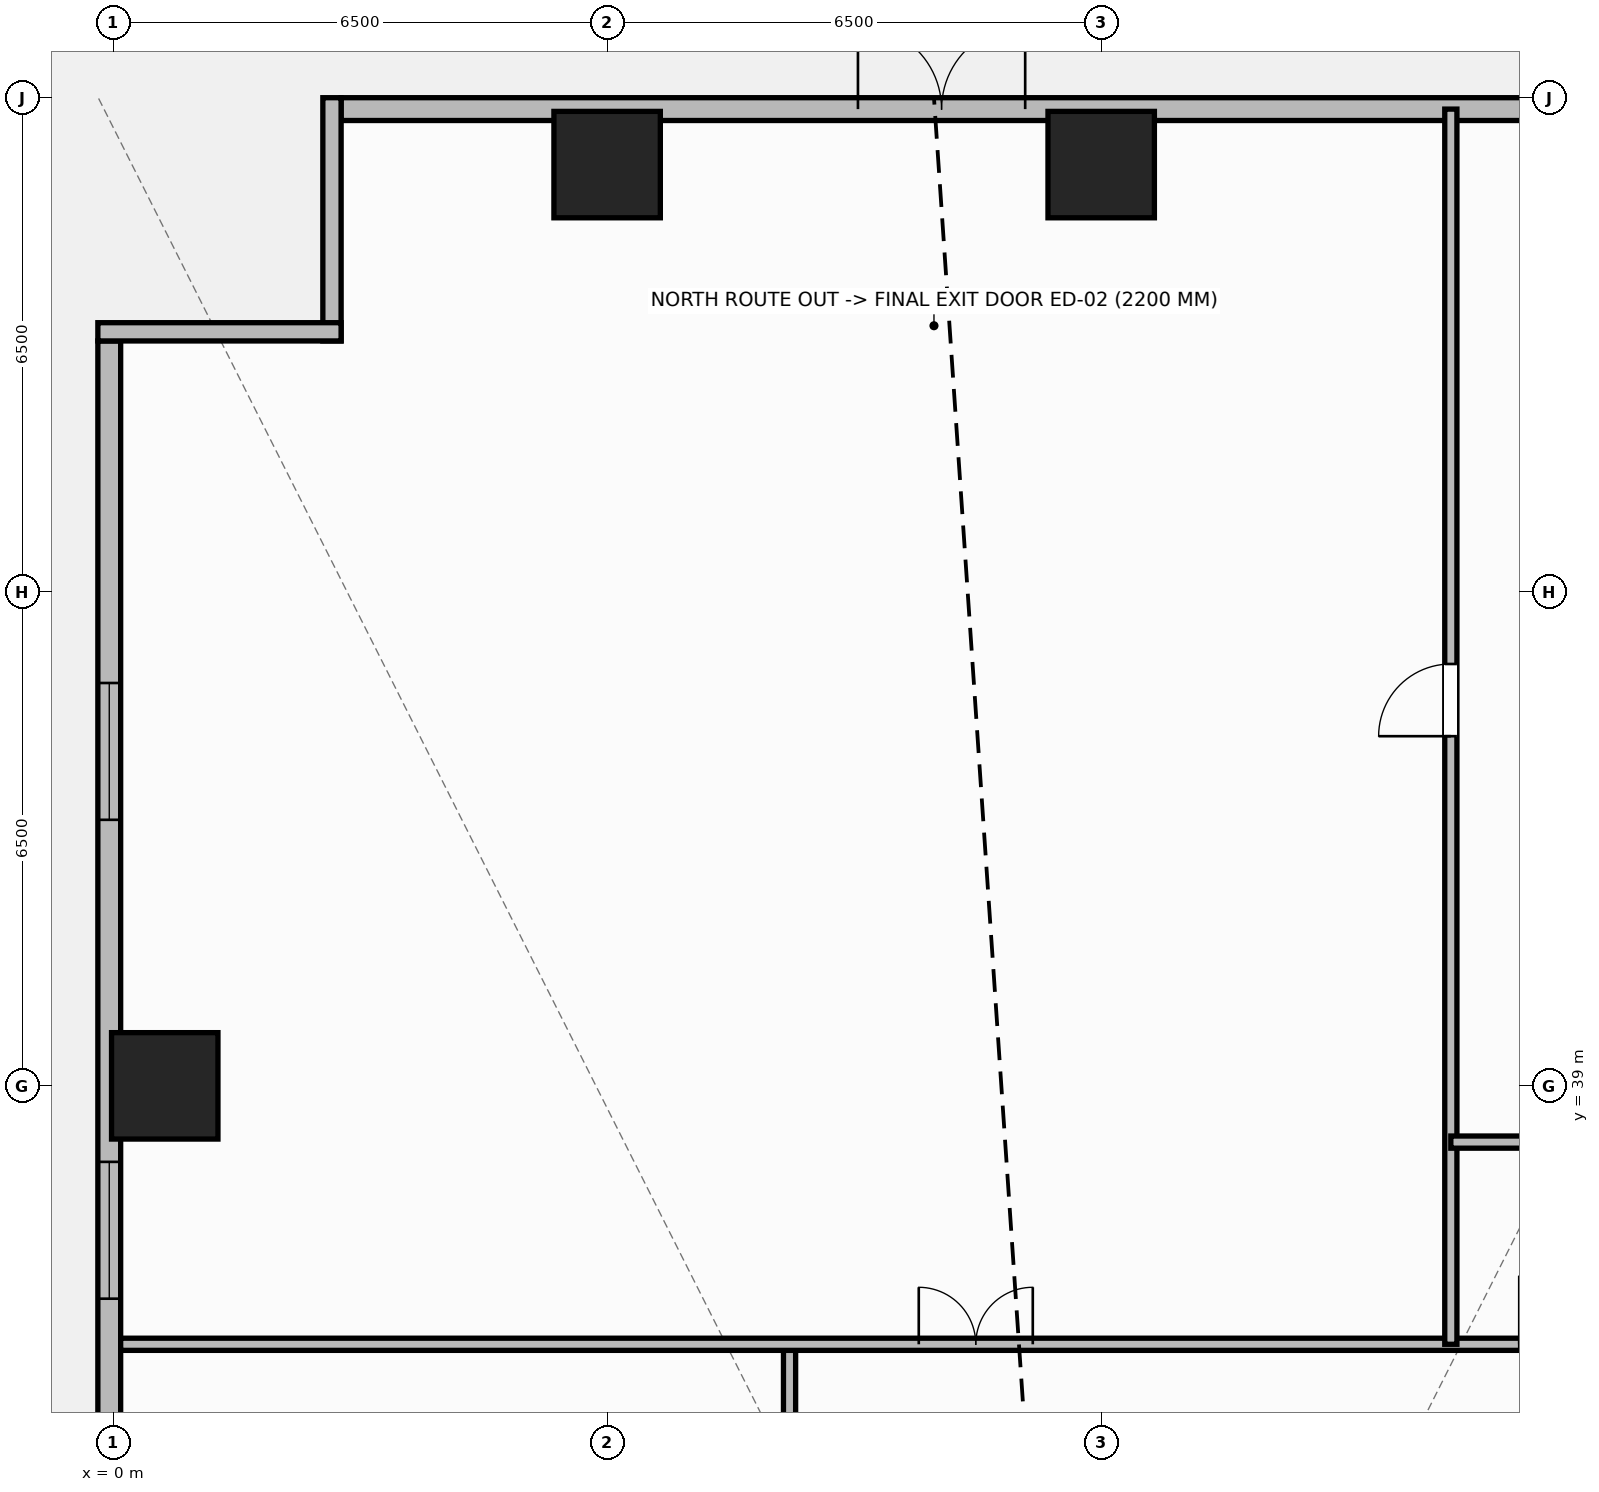
"""IFC4 building model, lengths in metres.
Left out: names, types, materials, properties, quantities, classifications, styles, units other than length and angle.
Written with IfcOpenShell. Run it as: python <this file> out.ifc"""

import sys

from ifc_helpers import new_model, si_unit, direction, frame, frame_2d, origin, origin_2d, place, context, subcontext, project, spatial, rectangle, extrude, element, fill, save


model = new_model("IFC4")
c1 = context("Model", 3, precision=1e-05, world=origin(), true_north=direction((0.0, 1.0)))
c2 = subcontext(c1, "Body", "Model", "MODEL_VIEW")
j1 = project(units=[si_unit("LENGTHUNIT", "METRE"), si_unit("PLANEANGLEUNIT", "RADIAN")], contexts=[c1])
p1 = place(None, origin())
s1 = spatial("IfcSite", under=j1, at=p1, CompositionType="ELEMENT")
p2 = place(p1, origin())
s2 = spatial("IfcBuilding", under=s1, at=p2, CompositionType="ELEMENT")
p3 = place(p2, origin())
s3 = spatial("IfcBuildingStorey", under=s2, at=p3, CompositionType="ELEMENT", Elevation=0.0)
for number, where, z_axis, x_axis in (
    (1, (6.5, 51.12, 0.0), (0.0, 0.0, 1.0), (1.0, 0.0, 0.0)),
    (2, (13.0, 51.12, 0.0), (0.0, 0.0, 1.0), (1.0, 0.0, 0.0)),
    (3, (0.68, 39.0, 0.0), (0.0, 0.0, 1.0), (1.0, 0.0, 0.0)),
):
    element("IfcColumn", number, at=place(p3, frame(where, z_axis=z_axis, x_axis=x_axis)), inside=s3, PredefinedType="COLUMN", context=c2, shape_type="SweptSolid", body=[
        extrude(rectangle(XDim=1.4, YDim=1.4, at=origin_2d()), origin(), (0.0, 0.0, 1.0), 6.0),
    ])
p4 = place(p3, frame((-0.05, 3.2, 0.0), z_axis=(0.0, 0.0, 1.0), x_axis=(0.0, 1.0, 0.0)))
e4 = element("IfcWall", 4, at=p4, inside=s3, PredefinedType="STANDARD", context=c2, shape_type="SweptSolid", body=[
    extrude(rectangle(XDim=45.6, YDim=0.3, at=frame_2d((22.8, 0.0))), origin(), (0.0, 0.0, 1.0), 5.72),
])
p5 = place(p4, frame((17.8, 0.0, 0.0)))
e5 = element("IfcOpeningElement", 5, at=p5, cuts=e4, PredefinedType="OPENING", context=c2, shape_type="SweptSolid", body=[
    extrude(rectangle(XDim=2.2, YDim=2.4, at=frame_2d((1.1, 1.2))), frame((0.0, 0.16, 0.0), z_axis=(0.0, -1.0, 0.0), x_axis=(1.0, 0.0, 0.0)), (0.0, 0.0, 1.0), 0.32),
])
p6 = place(p4, frame((24.8, 0.0, 0.0)))
e6 = element("IfcOpeningElement", 6, at=p6, cuts=e4, PredefinedType="OPENING", context=c2, shape_type="SweptSolid", body=[
    extrude(rectangle(XDim=1.1, YDim=2.2, at=frame_2d((0.55, 1.1))), frame((0.0, 0.16, 0.0), z_axis=(0.0, -1.0, 0.0), x_axis=(1.0, 0.0, 0.0)), (0.0, 0.0, 1.0), 0.32),
])
p7 = place(p4, frame((4.3, 0.0, 0.9)))
e7 = element("IfcOpeningElement", 7, at=p7, cuts=e4, PredefinedType="OPENING", context=c2, shape_type="SweptSolid", body=[
    extrude(rectangle(XDim=1.8, YDim=2.2, at=frame_2d((0.9, 1.1))), frame((0.0, 0.16, 0.0), z_axis=(0.0, -1.0, 0.0), x_axis=(1.0, 0.0, 0.0)), (0.0, 0.0, 1.0), 0.32),
])
p8 = place(p4, frame((11.3, 0.0, 0.9)))
e8 = element("IfcOpeningElement", 8, at=p8, cuts=e4, PredefinedType="OPENING", context=c2, shape_type="SweptSolid", body=[
    extrude(rectangle(XDim=1.8, YDim=2.2, at=frame_2d((0.9, 1.1))), frame((0.0, 0.16, 0.0), z_axis=(0.0, -1.0, 0.0), x_axis=(1.0, 0.0, 0.0)), (0.0, 0.0, 1.0), 0.32),
])
p9 = place(p4, frame((33.0, 0.0, 0.9)))
e9 = element("IfcOpeningElement", 9, at=p9, cuts=e4, PredefinedType="OPENING", context=c2, shape_type="SweptSolid", body=[
    extrude(rectangle(XDim=1.8, YDim=2.2, at=frame_2d((0.9, 1.1))), frame((0.0, 0.16, 0.0), z_axis=(0.0, -1.0, 0.0), x_axis=(1.0, 0.0, 0.0)), (0.0, 0.0, 1.0), 0.32),
])
p10 = place(p4, frame((39.3, 0.0, 0.9)))
e10 = element("IfcOpeningElement", 10, at=p10, cuts=e4, PredefinedType="OPENING", context=c2, shape_type="SweptSolid", body=[
    extrude(rectangle(XDim=1.8, YDim=2.2, at=frame_2d((0.9, 1.1))), frame((0.0, 0.16, 0.0), z_axis=(0.0, -1.0, 0.0), x_axis=(1.0, 0.0, 0.0)), (0.0, 0.0, 1.0), 0.32),
])
p11 = place(p3, frame((3.0, 51.85, 0.0), z_axis=(0.0, 0.0, 1.0), x_axis=(1.0, 0.0, 0.0)))
e11 = element("IfcWall", 11, at=p11, inside=s3, PredefinedType="STANDARD", context=c2, shape_type="SweptSolid", body=[
    extrude(rectangle(XDim=23.0, YDim=0.3, at=frame_2d((11.5, 0.0))), origin(), (0.0, 0.0, 1.0), 5.72),
])
p12 = place(p11, frame((6.8, 0.0, 0.0)))
e12 = element("IfcOpeningElement", 12, at=p12, cuts=e11, PredefinedType="OPENING", context=c2, shape_type="SweptSolid", body=[
    extrude(rectangle(XDim=2.2, YDim=2.4, at=frame_2d((1.1, 1.2))), frame((0.0, 0.16, 0.0), z_axis=(0.0, -1.0, 0.0), x_axis=(1.0, 0.0, 0.0)), (0.0, 0.0, 1.0), 0.32),
])
for number, where, z_axis, x_axis in (
    (13, (2.88, 48.8, 0.0), (0.0, 0.0, 1.0), (0.0, 1.0, 0.0)),
    (14, (-0.2, 48.92, 0.0), (0.0, 0.0, 1.0), (1.0, 0.0, 0.0)),
):
    element("IfcWall", number, at=place(p3, frame(where, z_axis=z_axis, x_axis=x_axis)), inside=s3, PredefinedType="STANDARD", context=c2, shape_type="SweptSolid", body=[
        extrude(rectangle(XDim=3.2, YDim=0.24, at=frame_2d((1.6, 0.0))), origin(), (0.0, 0.0, 1.0), 5.72),
    ])
p13 = place(p3, frame((8.9, 26.3, 0.0), z_axis=(0.0, 0.0, 1.0), x_axis=(0.0, 1.0, 0.0)))
e15 = element("IfcWall", 15, at=p13, inside=s3, PredefinedType="STANDARD", context=c2, shape_type="SweptSolid", body=[
    extrude(rectangle(XDim=9.3, YDim=0.16, at=frame_2d((4.65, 0.0))), origin(), (0.0, 0.0, 1.0), 5.72),
])
p14 = place(p13, frame((2.2, 0.0, 0.0)))
e16 = element("IfcOpeningElement", 16, at=p14, cuts=e15, PredefinedType="OPENING", context=c2, shape_type="SweptSolid", body=[
    extrude(rectangle(XDim=1.0, YDim=2.15, at=frame_2d((0.5, 1.075))), frame((0.0, 0.09, 0.0), z_axis=(0.0, -1.0, 0.0), x_axis=(1.0, 0.0, 0.0)), (0.0, 0.0, 1.0), 0.18),
])
p15 = place(p3, frame((0.1, 35.6, 0.0), z_axis=(0.0, 0.0, 1.0), x_axis=(1.0, 0.0, 0.0)))
e17 = element("IfcWall", 17, at=p15, inside=s3, PredefinedType="STANDARD", context=c2, shape_type="SweptSolid", body=[
    extrude(rectangle(XDim=25.82, YDim=0.16, at=frame_2d((12.91, 0.0))), origin(), (0.0, 0.0, 1.0), 5.72),
])
p16 = place(p15, frame((10.5, 0.0, 0.0)))
e18 = element("IfcOpeningElement", 18, at=p16, cuts=e17, PredefinedType="OPENING", context=c2, shape_type="SweptSolid", body=[
    extrude(rectangle(XDim=1.5, YDim=2.2, at=frame_2d((0.75, 1.1))), frame((0.0, 0.09, 0.0), z_axis=(0.0, -1.0, 0.0), x_axis=(1.0, 0.0, 0.0)), (0.0, 0.0, 1.0), 0.18),
])
p17 = place(p15, frame((18.4, 0.0, 0.0)))
e19 = element("IfcOpeningElement", 19, at=p17, cuts=e17, PredefinedType="OPENING", context=c2, shape_type="SweptSolid", body=[
    extrude(rectangle(XDim=0.9, YDim=2.15, at=frame_2d((0.45, 1.075))), frame((0.0, 0.09, 0.0), z_axis=(0.0, -1.0, 0.0), x_axis=(1.0, 0.0, 0.0)), (0.0, 0.0, 1.0), 0.18),
])
p18 = place(p15, frame((21.35, 0.0, 0.0)))
e20 = element("IfcOpeningElement", 20, at=p18, cuts=e17, PredefinedType="OPENING", context=c2, shape_type="SweptSolid", body=[
    extrude(rectangle(XDim=0.9, YDim=2.15, at=frame_2d((0.45, 1.075))), frame((0.0, 0.09, 0.0), z_axis=(0.0, -1.0, 0.0), x_axis=(1.0, 0.0, 0.0)), (0.0, 0.0, 1.0), 0.18),
])
p19 = place(p15, frame((23.95, 0.0, 0.0)))
e21 = element("IfcOpeningElement", 21, at=p19, cuts=e17, PredefinedType="OPENING", context=c2, shape_type="SweptSolid", body=[
    extrude(rectangle(XDim=0.9, YDim=2.15, at=frame_2d((0.45, 1.075))), frame((0.0, 0.09, 0.0), z_axis=(0.0, -1.0, 0.0), x_axis=(1.0, 0.0, 0.0)), (0.0, 0.0, 1.0), 0.18),
])
p20 = place(p3, frame((17.6, 35.6, 0.0), z_axis=(0.0, 0.0, 1.0), x_axis=(0.0, 1.0, 0.0)))
e22 = element("IfcWall", 22, at=p20, inside=s3, PredefinedType="STANDARD", context=c2, shape_type="SweptSolid", body=[
    extrude(rectangle(XDim=16.25, YDim=0.16, at=frame_2d((8.125, 0.0))), origin(), (0.0, 0.0, 1.0), 5.72),
])
p21 = place(p20, frame((8.0, 0.0, 0.0)))
e23 = element("IfcOpeningElement", 23, at=p21, cuts=e22, PredefinedType="OPENING", context=c2, shape_type="SweptSolid", body=[
    extrude(rectangle(XDim=0.95, YDim=2.15, at=frame_2d((0.475, 1.075))), frame((0.0, 0.09, 0.0), z_axis=(0.0, -1.0, 0.0), x_axis=(1.0, 0.0, 0.0)), (0.0, 0.0, 1.0), 0.18),
])
p22 = place(p3, frame((17.6, 38.26, 0.0), z_axis=(0.0, 0.0, 1.0), x_axis=(1.0, 0.0, 0.0)))
e24 = element("IfcWall", 24, at=p22, inside=s3, PredefinedType="STANDARD", context=c2, shape_type="SweptSolid", body=[
    extrude(rectangle(XDim=8.24, YDim=0.16, at=frame_2d((4.12, 0.0))), origin(), (0.0, 0.0, 1.0), 5.72),
])
p23 = place(p9, origin())
e25 = element("IfcWindow", 25, at=p23, inside=s3, PartitioningType="SINGLE_PANEL", PredefinedType="WINDOW", context=c2, shape_type="SweptSolid", body=[
    extrude(rectangle(XDim=1.8, YDim=2.2, at=frame_2d((0.9, 1.1))), frame((0.0, 0.03, 0.0), z_axis=(0.0, -1.0, 0.0), x_axis=(1.0, 0.0, 0.0)), (0.0, 0.0, 1.0), 0.06),
])
fill(e9, e25)
p24 = place(p10, origin())
e26 = element("IfcWindow", 26, at=p24, inside=s3, PartitioningType="SINGLE_PANEL", PredefinedType="WINDOW", context=c2, shape_type="SweptSolid", body=[
    extrude(rectangle(XDim=1.8, YDim=2.2, at=frame_2d((0.9, 1.1))), frame((0.0, 0.03, 0.0), z_axis=(0.0, -1.0, 0.0), x_axis=(1.0, 0.0, 0.0)), (0.0, 0.0, 1.0), 0.06),
])
fill(e10, e26)
p25 = place(p12, origin())
e27 = element("IfcDoor", 27, at=p25, inside=s3, OperationType="DOUBLE_DOOR_SINGLE_SWING", PredefinedType="DOOR", context=c2, shape_type="SweptSolid", body=[
    extrude(rectangle(XDim=2.2, YDim=2.4, at=frame_2d((1.1, 1.2))), frame((0.0, 0.025, 0.0), z_axis=(0.0, -1.0, 0.0), x_axis=(1.0, 0.0, 0.0)), (0.0, 0.0, 1.0), 0.05),
])
fill(e12, e27)
p26 = place(p16, origin())
e28 = element("IfcDoor", 28, at=p26, inside=s3, OperationType="DOUBLE_DOOR_SINGLE_SWING", PredefinedType="DOOR", context=c2, shape_type="SweptSolid", body=[
    extrude(rectangle(XDim=1.5, YDim=2.2, at=frame_2d((0.75, 1.1))), frame((0.0, 0.025, 0.0), z_axis=(0.0, -1.0, 0.0), x_axis=(1.0, 0.0, 0.0)), (0.0, 0.0, 1.0), 0.05),
])
fill(e18, e28)
p27 = place(p21, origin())
e29 = element("IfcDoor", 29, at=p27, inside=s3, OperationType="SINGLE_SWING_LEFT", PredefinedType="DOOR", context=c2, shape_type="SweptSolid", body=[
    extrude(rectangle(XDim=0.95, YDim=2.15, at=frame_2d((0.475, 1.075))), frame((0.0, 0.025, 0.0), z_axis=(0.0, -1.0, 0.0), x_axis=(1.0, 0.0, 0.0)), (0.0, 0.0, 1.0), 0.05),
])
fill(e23, e29)
save(model, sys.argv[1])
